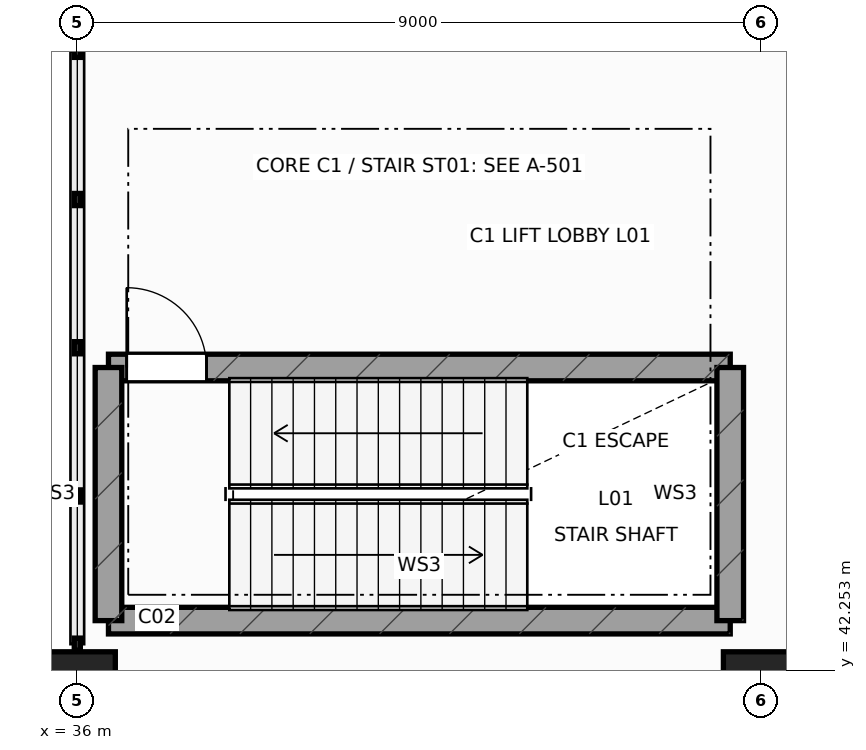
"""IFC4 building model, lengths in metres.
Left out: names, types, materials, properties, quantities, classifications, styles, units other than length and angle.
Written with IfcOpenShell. Run it as: python <this file> out.ifc"""

import sys

from ifc_helpers import new_model, si_unit, direction, frame, frame_2d, origin, origin_2d, place, context, subcontext, project, spatial, rectangle, extrude, element, fill, save


model = new_model("IFC4")
c1 = context("Model", 3, precision=1e-05, world=origin(), true_north=direction((0.0, 1.0)))
c2 = subcontext(c1, "Body", "Model", "MODEL_VIEW")
j1 = project(units=[si_unit("LENGTHUNIT", "METRE"), si_unit("PLANEANGLEUNIT", "RADIAN")], contexts=[c1])
p1 = place(None, origin())
s1 = spatial("IfcSite", under=j1, at=p1, CompositionType="ELEMENT")
p2 = place(p1, origin())
s2 = spatial("IfcBuilding", under=s1, at=p2, CompositionType="ELEMENT")
p3 = place(p2, frame((0.0, 0.0, 6.0)))
s3 = spatial("IfcBuildingStorey", under=s2, at=p3, CompositionType="ELEMENT", Elevation=6.0)
for number, where, z_axis, x_axis in (
    (1, (36.0, 42.0, 0.0), (0.0, 0.0, 1.0), (1.0, 0.0, 0.0)),
    (2, (45.0, 42.0, 0.0), (0.0, 0.0, 1.0), (1.0, 0.0, 0.0)),
):
    element("IfcColumn", number, at=place(p3, frame(where, z_axis=z_axis, x_axis=x_axis)), inside=s3, PredefinedType="COLUMN", context=c2, shape_type="SweptSolid", body=[
        extrude(rectangle(XDim=1.0, YDim=1.0, at=origin_2d()), origin(), (0.0, 0.0, 1.0), 5.4),
    ])
p4 = place(p3, frame((36.41, 42.91, 0.0), z_axis=(0.0, 0.0, 1.0), x_axis=(1.0, 0.0, 0.0)))
e3 = element("IfcWall", 3, at=p4, inside=s3, PredefinedType="SHEAR", context=c2, shape_type="SweptSolid", body=[
    extrude(rectangle(XDim=8.18, YDim=0.35, at=frame_2d((4.09, 0.0))), origin(), (0.0, 0.0, 1.0), 5.05),
])
p5 = place(p3, frame((36.41, 46.24, 0.0), z_axis=(0.0, 0.0, 1.0), x_axis=(1.0, 0.0, 0.0)))
e4 = element("IfcWall", 4, at=p5, inside=s3, PredefinedType="SHEAR", context=c2, shape_type="SweptSolid", body=[
    extrude(rectangle(XDim=8.18, YDim=0.35, at=frame_2d((4.09, 0.0))), origin(), (0.0, 0.0, 1.0), 5.05),
])
p6 = place(p5, frame((0.24, 0.0, 0.0)))
e5 = element("IfcOpeningElement", 5, at=p6, cuts=e4, PredefinedType="OPENING", context=c2, shape_type="SweptSolid", body=[
    extrude(rectangle(XDim=1.05, YDim=2.18, at=frame_2d((0.525, 1.09))), frame((0.0, 0.185, 0.0), z_axis=(0.0, -1.0, 0.0), x_axis=(1.0, 0.0, 0.0)), (0.0, 0.0, 1.0), 0.37),
])
for number, where, z_axis, x_axis in (
    (6, (36.41, 42.91, 0.0), (0.0, 0.0, 1.0), (0.0, 1.0, 0.0)),
    (7, (44.59, 42.91, 0.0), (0.0, 0.0, 1.0), (0.0, 1.0, 0.0)),
):
    element("IfcWall", number, at=place(p3, frame(where, z_axis=z_axis, x_axis=x_axis)), inside=s3, PredefinedType="SHEAR", context=c2, shape_type="SweptSolid", body=[
        extrude(rectangle(XDim=3.33, YDim=0.35, at=frame_2d((1.665, 0.0))), origin(), (0.0, 0.0, 1.0), 5.05),
    ])
p7 = place(p6, origin())
e8 = element("IfcDoor", 8, at=p7, inside=s3, OperationType="SINGLE_SWING_LEFT", PredefinedType="DOOR", context=c2, shape_type="SweptSolid", body=[
    extrude(rectangle(XDim=1.05, YDim=2.18, at=frame_2d((0.525, 1.09))), frame((0.0, 0.025, 0.0), z_axis=(0.0, -1.0, 0.0), x_axis=(1.0, 0.0, 0.0)), (0.0, 0.0, 1.0), 0.05),
])
fill(e5, e8)
save(model, sys.argv[1])
